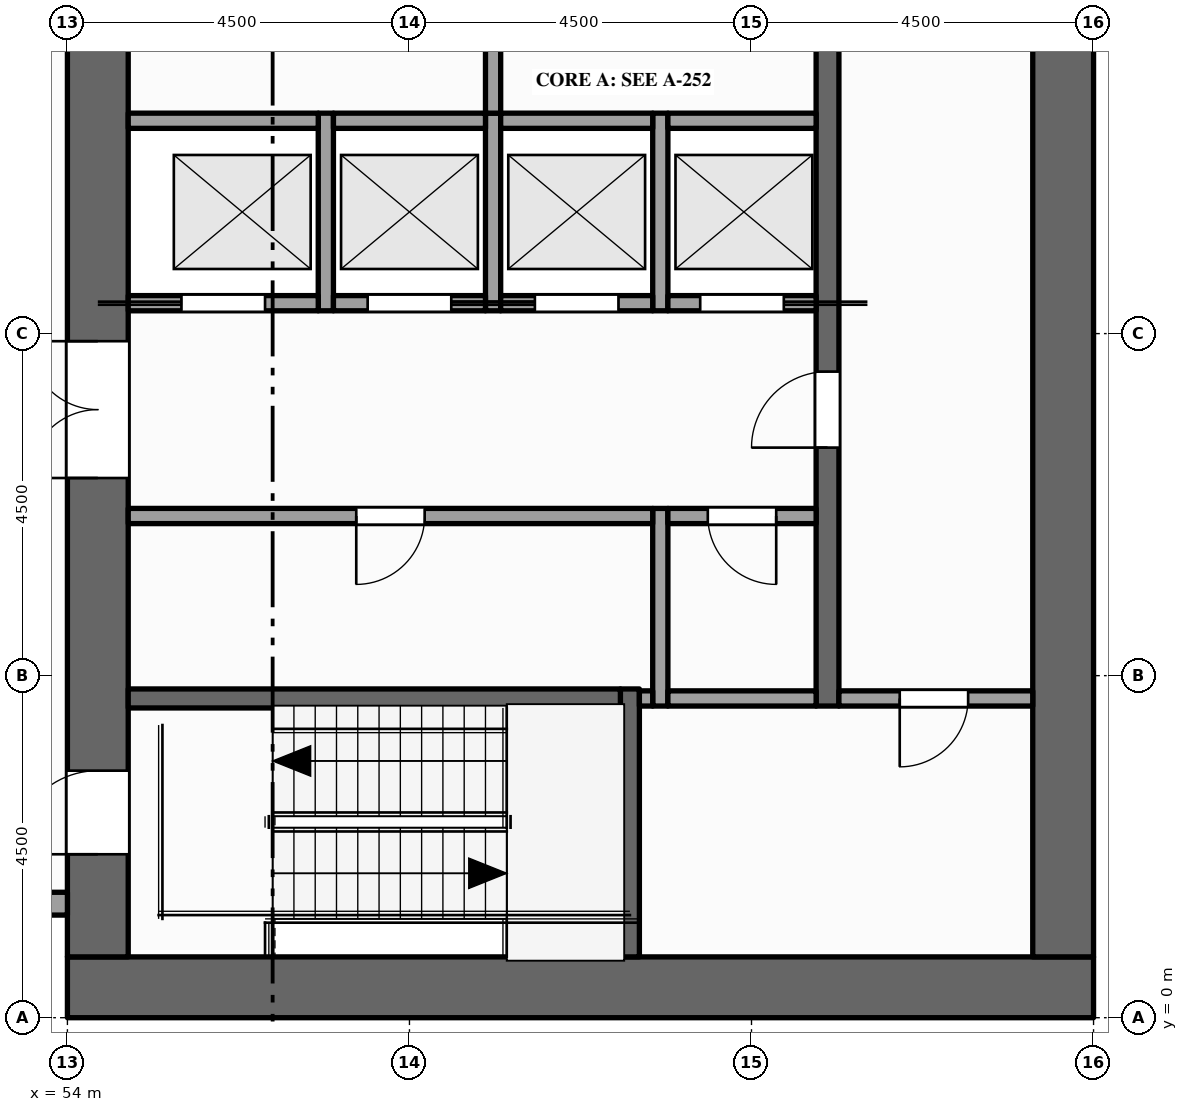
"""IFC4 building model, lengths in metres.
Left out: names, types, materials, properties, quantities, classifications, styles, units other than length and angle.
Written with IfcOpenShell. Run it as: python <this file> out.ifc"""

import sys

from ifc_helpers import new_model, si_unit, direction, frame, frame_2d, origin, place, context, subcontext, project, spatial, rectangle, extrude, element, fill, save


model = new_model("IFC4")
c1 = context("Model", 3, precision=1e-05, world=origin(), true_north=direction((0.0, 1.0)))
c2 = subcontext(c1, "Body", "Model", "MODEL_VIEW")
j1 = project(units=[si_unit("LENGTHUNIT", "METRE"), si_unit("PLANEANGLEUNIT", "RADIAN")], contexts=[c1])
p1 = place(None, origin())
s1 = spatial("IfcSite", under=j1, at=p1, CompositionType="ELEMENT")
p2 = place(p1, origin())
s2 = spatial("IfcBuilding", under=s1, at=p2, CompositionType="ELEMENT")
p3 = place(p2, frame((0.0, 0.0, 293.0)))
s3 = spatial("IfcBuildingStorey", under=s2, at=p3, CompositionType="ELEMENT", Elevation=293.0)
p4 = place(p3, frame((67.5, 0.4, -0.15), z_axis=(0.0, 0.0, 1.0), x_axis=(-1.0, 0.0, 0.0)))
e1 = element("IfcWall", 1, at=p4, inside=s3, PredefinedType="SHEAR", context=c2, shape_type="SweptSolid", body=[
    extrude(rectangle(XDim=13.5, YDim=0.8, at=frame_2d((6.75, 0.0))), origin(), (0.0, 0.0, 1.0), 4.0),
])
p5 = place(p3, frame((54.4, 0.8, -0.15), z_axis=(0.0, 0.0, 1.0), x_axis=(0.0, 1.0, 0.0)))
e2 = element("IfcWall", 2, at=p5, inside=s3, PredefinedType="SHEAR", context=c2, shape_type="SweptSolid", body=[
    extrude(rectangle(XDim=20.9, YDim=0.8, at=frame_2d((10.45, 0.0))), origin(), (0.0, 0.0, 1.0), 4.0),
])
p6 = place(p5, frame((6.3, 0.0, 0.15)))
e3 = element("IfcOpeningElement", 3, at=p6, cuts=e2, PredefinedType="OPENING", context=c2, shape_type="SweptSolid", body=[
    extrude(rectangle(XDim=1.8, YDim=2.1, at=frame_2d((0.9, 1.05))), frame((0.0, 0.41, 0.0), z_axis=(0.0, -1.0, 0.0), x_axis=(1.0, 0.0, 0.0)), (0.0, 0.0, 1.0), 0.82),
])
p7 = place(p5, frame((12.35, 0.0, 0.15)))
e4 = element("IfcOpeningElement", 4, at=p7, cuts=e2, PredefinedType="OPENING", context=c2, shape_type="SweptSolid", body=[
    extrude(rectangle(XDim=1.1, YDim=2.1, at=frame_2d((0.55, 1.05))), frame((0.0, 0.41, 0.0), z_axis=(0.0, -1.0, 0.0), x_axis=(1.0, 0.0, 0.0)), (0.0, 0.0, 1.0), 0.82),
])
p8 = place(p5, frame((1.35, 0.0, 0.15)))
e5 = element("IfcOpeningElement", 5, at=p8, cuts=e2, PredefinedType="OPENING", context=c2, shape_type="SweptSolid", body=[
    extrude(rectangle(XDim=1.1, YDim=2.1, at=frame_2d((0.55, 1.05))), frame((0.0, 0.41, 0.0), z_axis=(0.0, -1.0, 0.0), x_axis=(1.0, 0.0, 0.0)), (0.0, 0.0, 1.0), 0.82),
])
p9 = place(p5, frame((18.55, 0.0, 0.15)))
e6 = element("IfcOpeningElement", 6, at=p9, cuts=e2, PredefinedType="OPENING", context=c2, shape_type="SweptSolid", body=[
    extrude(rectangle(XDim=1.1, YDim=2.1, at=frame_2d((0.55, 1.05))), frame((0.0, 0.41, 0.0), z_axis=(0.0, -1.0, 0.0), x_axis=(1.0, 0.0, 0.0)), (0.0, 0.0, 1.0), 0.82),
])
p10 = place(p3, frame((67.1, 0.8, -0.15), z_axis=(0.0, 0.0, 1.0), x_axis=(0.0, 1.0, 0.0)))
e7 = element("IfcWall", 7, at=p10, inside=s3, PredefinedType="SHEAR", context=c2, shape_type="SweptSolid", body=[
    extrude(rectangle(XDim=20.9, YDim=0.8, at=frame_2d((10.45, 0.0))), origin(), (0.0, 0.0, 1.0), 4.0),
])
p11 = place(p3, frame((49.825, 1.5, 0.0), z_axis=(0.0, 0.0, 1.0), x_axis=(1.0, 0.0, 0.0)))
e8 = element("IfcWall", 8, at=p11, inside=s3, PredefinedType="STANDARD", context=c2, shape_type="SweptSolid", body=[
    extrude(rectangle(XDim=4.175, YDim=0.3, at=frame_2d((2.087, 0.0))), origin(), (0.0, 0.0, 1.0), 2.77),
])
p12 = place(p11, frame((0.413, 0.0, 0.9)))
e9 = element("IfcOpeningElement", 9, at=p12, cuts=e8, PredefinedType="OPENING", context=c2, shape_type="SweptSolid", body=[
    extrude(rectangle(XDim=1.2, YDim=1.5, at=frame_2d((0.6, 0.75))), frame((0.0, 0.16, 0.0), z_axis=(0.0, -1.0, 0.0), x_axis=(1.0, 0.0, 0.0)), (0.0, 0.0, 1.0), 0.32),
])
p13 = place(p11, frame((2.225, 0.0, 0.9)))
e10 = element("IfcOpeningElement", 10, at=p13, cuts=e8, PredefinedType="OPENING", context=c2, shape_type="SweptSolid", body=[
    extrude(rectangle(XDim=1.55, YDim=1.5, at=frame_2d((0.775, 0.75))), frame((0.0, 0.16, 0.0), z_axis=(0.0, -1.0, 0.0), x_axis=(1.0, 0.0, 0.0)), (0.0, 0.0, 1.0), 0.32),
])
for number, where, z_axis, x_axis in (
    (11, (57.4, 9.3, 0.0), (0.0, 0.0, 1.0), (0.0, 1.0, 0.0)),
    (12, (59.6, 9.3, 0.0), (0.0, 0.0, 1.0), (0.0, 1.0, 0.0)),
):
    element("IfcWall", number, at=place(p3, frame(where, z_axis=z_axis, x_axis=x_axis)), inside=s3, PredefinedType="SOLIDWALL", context=c2, shape_type="SweptSolid", body=[
        extrude(rectangle(XDim=2.6, YDim=0.2, at=frame_2d((1.3, 0.0))), origin(), (0.0, 0.0, 1.0), 3.75),
    ])
p14 = place(p3, frame((59.6, 11.9, 0.0), z_axis=(0.0, 0.0, 1.0), x_axis=(0.0, 1.0, 0.0)))
e13 = element("IfcWall", 13, at=p14, inside=s3, PredefinedType="PARTITIONING", context=c2, shape_type="SweptSolid", body=[
    extrude(rectangle(XDim=3.6, YDim=0.2, at=frame_2d((1.8, 0.0))), origin(), (0.0, 0.0, 1.0), 3.75),
])
p15 = place(p14, frame((1.3, 0.0, 0.0)))
e14 = element("IfcOpeningElement", 14, at=p15, cuts=e13, PredefinedType="OPENING", context=c2, shape_type="SweptSolid", body=[
    extrude(rectangle(XDim=1.0, YDim=2.1, at=frame_2d((0.5, 1.05))), frame((0.0, 0.11, 0.0), z_axis=(0.0, -1.0, 0.0), x_axis=(1.0, 0.0, 0.0)), (0.0, 0.0, 1.0), 0.22),
])
p16 = place(p3, frame((61.4, 0.8, 0.0), z_axis=(0.0, 0.0, 1.0), x_axis=(0.0, 1.0, 0.0)))
e15 = element("IfcWall", 15, at=p16, inside=s3, PredefinedType="SHEAR", context=c2, shape_type="SweptSolid", body=[
    extrude(rectangle(XDim=3.525, YDim=0.25, at=frame_2d((1.762, 0.0))), origin(), (0.0, 0.0, 1.0), 3.75),
])
p17 = place(p3, frame((61.8, 4.1, 0.0), z_axis=(0.0, 0.0, 1.0), x_axis=(0.0, 1.0, 0.0)))
e16 = element("IfcWall", 16, at=p17, inside=s3, PredefinedType="PARTITIONING", context=c2, shape_type="SweptSolid", body=[
    extrude(rectangle(XDim=2.6, YDim=0.2, at=frame_2d((1.3, 0.0))), origin(), (0.0, 0.0, 1.0), 3.75),
])
p18 = place(p3, frame((61.8, 9.3, 0.0), z_axis=(0.0, 0.0, 1.0), x_axis=(0.0, 1.0, 0.0)))
e17 = element("IfcWall", 17, at=p18, inside=s3, PredefinedType="SOLIDWALL", context=c2, shape_type="SweptSolid", body=[
    extrude(rectangle(XDim=2.6, YDim=0.2, at=frame_2d((1.3, 0.0))), origin(), (0.0, 0.0, 1.0), 3.75),
])
p19 = place(p3, frame((64.0, 4.1, 0.0), z_axis=(0.0, 0.0, 1.0), x_axis=(0.0, 1.0, 0.0)))
e18 = element("IfcWall", 18, at=p19, inside=s3, PredefinedType="SHEAR", context=c2, shape_type="SweptSolid", body=[
    extrude(rectangle(XDim=14.5, YDim=0.3, at=frame_2d((7.25, 0.0))), origin(), (0.0, 0.0, 1.0), 3.75),
])
p20 = place(p19, frame((3.4, 0.0, 0.0)))
e19 = element("IfcOpeningElement", 19, at=p20, cuts=e18, PredefinedType="OPENING", context=c2, shape_type="SweptSolid", body=[
    extrude(rectangle(XDim=1.0, YDim=2.1, at=frame_2d((0.5, 1.05))), frame((0.0, 0.16, 0.0), z_axis=(0.0, -1.0, 0.0), x_axis=(1.0, 0.0, 0.0)), (0.0, 0.0, 1.0), 0.32),
])
p21 = place(p19, frame((9.1, 0.0, 0.0)))
e20 = element("IfcOpeningElement", 20, at=p21, cuts=e18, PredefinedType="OPENING", context=c2, shape_type="SweptSolid", body=[
    extrude(rectangle(XDim=1.0, YDim=2.1, at=frame_2d((0.5, 1.05))), frame((0.0, 0.16, 0.0), z_axis=(0.0, -1.0, 0.0), x_axis=(1.0, 0.0, 0.0)), (0.0, 0.0, 1.0), 0.32),
])
p22 = place(p3, frame((54.8, 4.2, 0.0), z_axis=(0.0, 0.0, 1.0), x_axis=(1.0, 0.0, 0.0)))
e21 = element("IfcWall", 21, at=p22, inside=s3, PredefinedType="SHEAR", context=c2, shape_type="SweptSolid", body=[
    extrude(rectangle(XDim=6.475, YDim=0.25, at=frame_2d((3.237, 0.0))), origin(), (0.0, 0.0, 1.0), 3.75),
])
p23 = place(p3, frame((61.525, 4.2, 0.0), z_axis=(0.0, 0.0, 1.0), x_axis=(1.0, 0.0, 0.0)))
e22 = element("IfcWall", 22, at=p23, inside=s3, PredefinedType="PARTITIONING", context=c2, shape_type="SweptSolid", body=[
    extrude(rectangle(XDim=0.175, YDim=0.2, at=frame_2d((0.087, 0.0))), origin(), (0.0, 0.0, 1.0), 3.75),
])
p24 = place(p3, frame((61.9, 4.2, 0.0), z_axis=(0.0, 0.0, 1.0), x_axis=(1.0, 0.0, 0.0)))
e23 = element("IfcWall", 23, at=p24, inside=s3, PredefinedType="PARTITIONING", context=c2, shape_type="SweptSolid", body=[
    extrude(rectangle(XDim=1.95, YDim=0.2, at=frame_2d((0.975, 0.0))), origin(), (0.0, 0.0, 1.0), 3.75),
])
p25 = place(p3, frame((64.15, 4.2, 0.0), z_axis=(0.0, 0.0, 1.0), x_axis=(1.0, 0.0, 0.0)))
e24 = element("IfcWall", 24, at=p25, inside=s3, PredefinedType="PARTITIONING", context=c2, shape_type="SweptSolid", body=[
    extrude(rectangle(XDim=2.55, YDim=0.2, at=frame_2d((1.275, 0.0))), origin(), (0.0, 0.0, 1.0), 3.75),
])
p26 = place(p25, frame((0.8, 0.0, 0.0)))
e25 = element("IfcOpeningElement", 25, at=p26, cuts=e24, PredefinedType="OPENING", context=c2, shape_type="SweptSolid", body=[
    extrude(rectangle(XDim=0.9, YDim=2.1, at=frame_2d((0.45, 1.05))), frame((0.0, 0.11, 0.0), z_axis=(0.0, -1.0, 0.0), x_axis=(1.0, 0.0, 0.0)), (0.0, 0.0, 1.0), 0.22),
])
p27 = place(p3, frame((54.8, 6.6, 0.0), z_axis=(0.0, 0.0, 1.0), x_axis=(1.0, 0.0, 0.0)))
e26 = element("IfcWall", 26, at=p27, inside=s3, PredefinedType="PARTITIONING", context=c2, shape_type="SweptSolid", body=[
    extrude(rectangle(XDim=6.9, YDim=0.2, at=frame_2d((3.45, 0.0))), origin(), (0.0, 0.0, 1.0), 3.75),
])
p28 = place(p27, frame((3.0, 0.0, 0.0)))
e27 = element("IfcOpeningElement", 27, at=p28, cuts=e26, PredefinedType="OPENING", context=c2, shape_type="SweptSolid", body=[
    extrude(rectangle(XDim=0.9, YDim=2.1, at=frame_2d((0.45, 1.05))), frame((0.0, 0.11, 0.0), z_axis=(0.0, -1.0, 0.0), x_axis=(1.0, 0.0, 0.0)), (0.0, 0.0, 1.0), 0.22),
])
p29 = place(p3, frame((61.9, 6.6, 0.0), z_axis=(0.0, 0.0, 1.0), x_axis=(1.0, 0.0, 0.0)))
e28 = element("IfcWall", 28, at=p29, inside=s3, PredefinedType="PARTITIONING", context=c2, shape_type="SweptSolid", body=[
    extrude(rectangle(XDim=1.95, YDim=0.2, at=frame_2d((0.975, 0.0))), origin(), (0.0, 0.0, 1.0), 3.75),
])
p30 = place(p29, frame((0.525, 0.0, 0.0)))
e29 = element("IfcOpeningElement", 29, at=p30, cuts=e28, PredefinedType="OPENING", context=c2, shape_type="SweptSolid", body=[
    extrude(rectangle(XDim=0.9, YDim=2.1, at=frame_2d((0.45, 1.05))), frame((0.0, 0.11, 0.0), z_axis=(0.0, -1.0, 0.0), x_axis=(1.0, 0.0, 0.0)), (0.0, 0.0, 1.0), 0.22),
])
p31 = place(p3, frame((54.8, 9.4, 0.0), z_axis=(0.0, 0.0, 1.0), x_axis=(1.0, 0.0, 0.0)))
e30 = element("IfcWall", 30, at=p31, inside=s3, PredefinedType="SOLIDWALL", context=c2, shape_type="SweptSolid", body=[
    extrude(rectangle(XDim=2.5, YDim=0.2, at=frame_2d((1.25, 0.0))), origin(), (0.0, 0.0, 1.0), 3.75),
])
p32 = place(p31, frame((0.7, 0.0, 0.012)))
e31 = element("IfcOpeningElement", 31, at=p32, cuts=e30, PredefinedType="OPENING", context=c2, shape_type="SweptSolid", body=[
    extrude(rectangle(XDim=1.1, YDim=2.1, at=frame_2d((0.55, 1.05))), frame((0.0, 0.11, 0.0), z_axis=(0.0, -1.0, 0.0), x_axis=(1.0, 0.0, 0.0)), (0.0, 0.0, 1.0), 0.22),
])
p33 = place(p3, frame((57.5, 9.4, 0.0), z_axis=(0.0, 0.0, 1.0), x_axis=(1.0, 0.0, 0.0)))
e32 = element("IfcWall", 32, at=p33, inside=s3, PredefinedType="SOLIDWALL", context=c2, shape_type="SweptSolid", body=[
    extrude(rectangle(XDim=2.0, YDim=0.2, at=frame_2d((1.0, 0.0))), origin(), (0.0, 0.0, 1.0), 3.75),
])
p34 = place(p33, frame((0.45, 0.0, 0.012)))
e33 = element("IfcOpeningElement", 33, at=p34, cuts=e32, PredefinedType="OPENING", context=c2, shape_type="SweptSolid", body=[
    extrude(rectangle(XDim=1.1, YDim=2.1, at=frame_2d((0.55, 1.05))), frame((0.0, 0.11, 0.0), z_axis=(0.0, -1.0, 0.0), x_axis=(1.0, 0.0, 0.0)), (0.0, 0.0, 1.0), 0.22),
])
p35 = place(p3, frame((59.7, 9.4, 0.0), z_axis=(0.0, 0.0, 1.0), x_axis=(1.0, 0.0, 0.0)))
e34 = element("IfcWall", 34, at=p35, inside=s3, PredefinedType="SOLIDWALL", context=c2, shape_type="SweptSolid", body=[
    extrude(rectangle(XDim=2.0, YDim=0.2, at=frame_2d((1.0, 0.0))), origin(), (0.0, 0.0, 1.0), 3.75),
])
p36 = place(p35, frame((0.45, 0.0, 0.012)))
e35 = element("IfcOpeningElement", 35, at=p36, cuts=e34, PredefinedType="OPENING", context=c2, shape_type="SweptSolid", body=[
    extrude(rectangle(XDim=1.1, YDim=2.1, at=frame_2d((0.55, 1.05))), frame((0.0, 0.11, 0.0), z_axis=(0.0, -1.0, 0.0), x_axis=(1.0, 0.0, 0.0)), (0.0, 0.0, 1.0), 0.22),
])
p37 = place(p3, frame((61.9, 9.4, 0.0), z_axis=(0.0, 0.0, 1.0), x_axis=(1.0, 0.0, 0.0)))
e36 = element("IfcWall", 36, at=p37, inside=s3, PredefinedType="SOLIDWALL", context=c2, shape_type="SweptSolid", body=[
    extrude(rectangle(XDim=1.95, YDim=0.2, at=frame_2d((0.975, 0.0))), origin(), (0.0, 0.0, 1.0), 3.75),
])
p38 = place(p37, frame((0.425, 0.0, 0.012)))
e37 = element("IfcOpeningElement", 37, at=p38, cuts=e36, PredefinedType="OPENING", context=c2, shape_type="SweptSolid", body=[
    extrude(rectangle(XDim=1.1, YDim=2.1, at=frame_2d((0.55, 1.05))), frame((0.0, 0.11, 0.0), z_axis=(0.0, -1.0, 0.0), x_axis=(1.0, 0.0, 0.0)), (0.0, 0.0, 1.0), 0.22),
])
p39 = place(p3, frame((54.8, 11.8, 0.0), z_axis=(0.0, 0.0, 1.0), x_axis=(1.0, 0.0, 0.0)))
e38 = element("IfcWall", 38, at=p39, inside=s3, PredefinedType="SOLIDWALL", context=c2, shape_type="SweptSolid", body=[
    extrude(rectangle(XDim=2.5, YDim=0.2, at=frame_2d((1.25, 0.0))), origin(), (0.0, 0.0, 1.0), 3.75),
])
for number, where, z_axis, x_axis in (
    (39, (57.5, 11.8, 0.0), (0.0, 0.0, 1.0), (1.0, 0.0, 0.0)),
    (40, (59.7, 11.8, 0.0), (0.0, 0.0, 1.0), (1.0, 0.0, 0.0)),
):
    element("IfcWall", number, at=place(p3, frame(where, z_axis=z_axis, x_axis=x_axis)), inside=s3, PredefinedType="SOLIDWALL", context=c2, shape_type="SweptSolid", body=[
        extrude(rectangle(XDim=2.0, YDim=0.2, at=frame_2d((1.0, 0.0))), origin(), (0.0, 0.0, 1.0), 3.75),
    ])
p40 = place(p3, frame((61.9, 11.8, 0.0), z_axis=(0.0, 0.0, 1.0), x_axis=(1.0, 0.0, 0.0)))
e41 = element("IfcWall", 41, at=p40, inside=s3, PredefinedType="SOLIDWALL", context=c2, shape_type="SweptSolid", body=[
    extrude(rectangle(XDim=1.95, YDim=0.2, at=frame_2d((0.975, 0.0))), origin(), (0.0, 0.0, 1.0), 3.75),
])
p41 = place(p32, origin())
e42 = element("IfcDoor", 42, at=p41, inside=s3, OperationType="SLIDING_TO_LEFT", PredefinedType="DOOR", context=c2, shape_type="SweptSolid", body=[
    extrude(rectangle(XDim=1.1, YDim=2.1, at=frame_2d((0.55, 1.05))), frame((0.0, 0.025, 0.0), z_axis=(0.0, -1.0, 0.0), x_axis=(1.0, 0.0, 0.0)), (0.0, 0.0, 1.0), 0.05),
])
fill(e31, e42)
p42 = place(p34, origin())
e43 = element("IfcDoor", 43, at=p42, inside=s3, OperationType="SLIDING_TO_RIGHT", PredefinedType="DOOR", context=c2, shape_type="SweptSolid", body=[
    extrude(rectangle(XDim=1.1, YDim=2.1, at=frame_2d((0.55, 1.05))), frame((0.0, 0.025, 0.0), z_axis=(0.0, -1.0, 0.0), x_axis=(1.0, 0.0, 0.0)), (0.0, 0.0, 1.0), 0.05),
])
fill(e33, e43)
p43 = place(p36, origin())
e44 = element("IfcDoor", 44, at=p43, inside=s3, OperationType="SLIDING_TO_LEFT", PredefinedType="DOOR", context=c2, shape_type="SweptSolid", body=[
    extrude(rectangle(XDim=1.1, YDim=2.1, at=frame_2d((0.55, 1.05))), frame((0.0, 0.025, 0.0), z_axis=(0.0, -1.0, 0.0), x_axis=(1.0, 0.0, 0.0)), (0.0, 0.0, 1.0), 0.05),
])
fill(e35, e44)
p44 = place(p38, origin())
e45 = element("IfcDoor", 45, at=p44, inside=s3, OperationType="SLIDING_TO_RIGHT", PredefinedType="DOOR", context=c2, shape_type="SweptSolid", body=[
    extrude(rectangle(XDim=1.1, YDim=2.1, at=frame_2d((0.55, 1.05))), frame((0.0, 0.025, 0.0), z_axis=(0.0, -1.0, 0.0), x_axis=(1.0, 0.0, 0.0)), (0.0, 0.0, 1.0), 0.05),
])
fill(e37, e45)
p45 = place(p6, origin())
e46 = element("IfcDoor", 46, at=p45, inside=s3, OperationType="DOUBLE_DOOR_SINGLE_SWING", PredefinedType="DOOR", context=c2, shape_type="SweptSolid", body=[
    extrude(rectangle(XDim=1.8, YDim=2.1, at=frame_2d((0.9, 1.05))), frame((0.0, 0.025, 0.0), z_axis=(0.0, -1.0, 0.0), x_axis=(1.0, 0.0, 0.0)), (0.0, 0.0, 1.0), 0.05),
])
fill(e3, e46)
p46 = place(p20, origin())
e47 = element("IfcDoor", 47, at=p46, inside=s3, OperationType="SINGLE_SWING_LEFT", PredefinedType="DOOR", context=c2, shape_type="SweptSolid", body=[
    extrude(rectangle(XDim=1.0, YDim=2.1, at=frame_2d((0.5, 1.05))), frame((0.0, 0.025, 0.0), z_axis=(0.0, -1.0, 0.0), x_axis=(1.0, 0.0, 0.0)), (0.0, 0.0, 1.0), 0.05),
])
fill(e19, e47)
p47 = place(p8, origin())
e48 = element("IfcDoor", 48, at=p47, inside=s3, OperationType="SINGLE_SWING_LEFT", PredefinedType="DOOR", context=c2, shape_type="SweptSolid", body=[
    extrude(rectangle(XDim=1.1, YDim=2.1, at=frame_2d((0.55, 1.05))), frame((0.0, 0.025, 0.0), z_axis=(0.0, -1.0, 0.0), x_axis=(1.0, 0.0, 0.0)), (0.0, 0.0, 1.0), 0.05),
])
fill(e5, e48)
p48 = place(p26, origin())
e49 = element("IfcDoor", 49, at=p48, inside=s3, OperationType="SINGLE_SWING_LEFT", PredefinedType="DOOR", context=c2, shape_type="SweptSolid", body=[
    extrude(rectangle(XDim=0.9, YDim=2.1, at=frame_2d((0.45, 1.05))), frame((0.0, 0.025, 0.0), z_axis=(0.0, -1.0, 0.0), x_axis=(1.0, 0.0, 0.0)), (0.0, 0.0, 1.0), 0.05),
])
fill(e25, e49)
p49 = place(p28, origin())
e50 = element("IfcDoor", 50, at=p49, inside=s3, OperationType="SINGLE_SWING_LEFT", PredefinedType="DOOR", context=c2, shape_type="SweptSolid", body=[
    extrude(rectangle(XDim=0.9, YDim=2.1, at=frame_2d((0.45, 1.05))), frame((0.0, 0.025, 0.0), z_axis=(0.0, -1.0, 0.0), x_axis=(1.0, 0.0, 0.0)), (0.0, 0.0, 1.0), 0.05),
])
fill(e27, e50)
p50 = place(p30, origin())
e51 = element("IfcDoor", 51, at=p50, inside=s3, OperationType="SINGLE_SWING_RIGHT", PredefinedType="DOOR", context=c2, shape_type="SweptSolid", body=[
    extrude(rectangle(XDim=0.9, YDim=2.1, at=frame_2d((0.45, 1.05))), frame((0.0, 0.025, 0.0), z_axis=(0.0, -1.0, 0.0), x_axis=(1.0, 0.0, 0.0)), (0.0, 0.0, 1.0), 0.05),
])
fill(e29, e51)
save(model, sys.argv[1])
